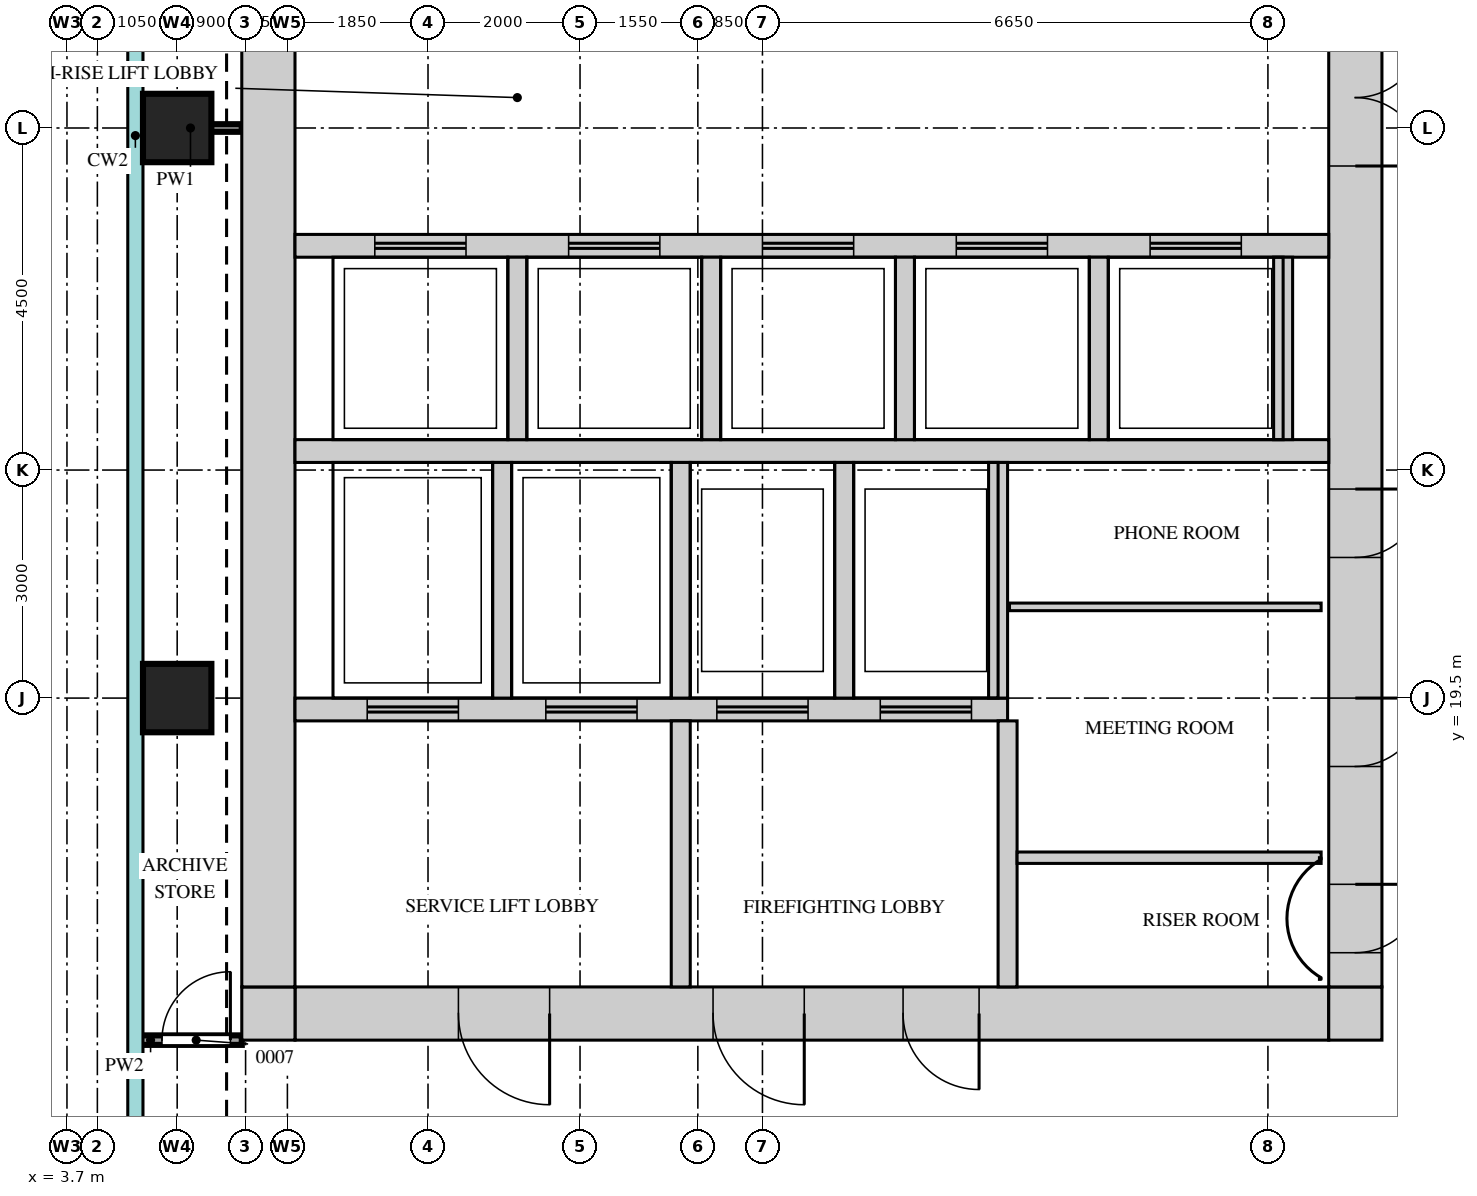
"""IFC4 building model, lengths in metres.
Left out: names, types, materials, properties, quantities, classifications, styles, units other than length and angle.
Written with IfcOpenShell. Run it as: python <this file> out.ifc"""

import sys

from ifc_helpers import new_model, si_unit, direction, frame, frame_2d, origin, origin_2d, place, context, subcontext, project, spatial, rectangle, extrude, source, transform, mapped, element, fill, save


model = new_model("IFC4")
c1 = context("Model", 3, precision=1e-05, world=origin(), true_north=direction((0.0, 1.0)))
c2 = subcontext(c1, "Body", "Model", "MODEL_VIEW")
j1 = project(units=[si_unit("LENGTHUNIT", "METRE"), si_unit("PLANEANGLEUNIT", "RADIAN")], contexts=[c1])
p1 = place(None, origin())
s1 = spatial("IfcSite", under=j1, at=p1, CompositionType="ELEMENT")
p2 = place(p1, origin())
s2 = spatial("IfcBuilding", under=s1, at=p2, CompositionType="ELEMENT")
p3 = place(p2, frame((0.0, 0.0, 226.2)))
s3 = spatial("IfcBuildingStorey", under=s2, at=p3, CompositionType="ELEMENT", Elevation=226.2)
m1 = source(origin(), c2, "Body", "SweptSolid", [
    extrude(rectangle(XDim=13.6, YDim=0.7, at=frame_2d((6.8, 0.0))), origin(), (0.0, 0.0, 1.0), 3.75),
])
p4 = place(p3, frame((6.7, 15.35, 0.0), z_axis=(0.0, 0.0, 1.0), x_axis=(1.0, 0.0, 0.0)))
e1 = element("IfcWall", 1, at=p4, inside=s3, PredefinedType="SHEAR", context=c2, shape_type="MappedRepresentation", body=[
    mapped(m1, transform((0.0, 0.0, 0.0))),
])
m2 = source(origin(), c2, "Body", "SweptSolid", [
    extrude(rectangle(XDim=1.2, YDim=2.1, at=frame_2d((0.6, 1.05))), frame((0.0, 0.36, 0.0), z_axis=(0.0, -1.0, 0.0), x_axis=(1.0, 0.0, 0.0)), (0.0, 0.0, 1.0), 0.72),
])
p5 = place(p4, frame((5.5, 0.0, 0.0)))
e2 = element("IfcOpeningElement", 2, at=p5, cuts=e1, PredefinedType="OPENING", context=c2, shape_type="MappedRepresentation", body=[
    mapped(m2, transform((0.0, 0.0, 0.0))),
])
p6 = place(p4, frame((2.15, 0.0, 0.0)))
e3 = element("IfcOpeningElement", 3, at=p6, cuts=e1, PredefinedType="OPENING", context=c2, shape_type="MappedRepresentation", body=[
    mapped(m2, transform((0.0, 0.0, 0.0))),
])
m3 = source(origin(), c2, "Body", "SweptSolid", [
    extrude(rectangle(XDim=1.0, YDim=2.1, at=frame_2d((0.5, 1.05))), frame((0.0, 0.36, 0.0), z_axis=(0.0, -1.0, 0.0), x_axis=(1.0, 0.0, 0.0)), (0.0, 0.0, 1.0), 0.72),
])
p7 = place(p4, frame((8.0, 0.0, 0.0)))
e4 = element("IfcOpeningElement", 4, at=p7, cuts=e1, PredefinedType="OPENING", context=c2, shape_type="MappedRepresentation", body=[
    mapped(m3, transform((0.0, 0.0, 0.0))),
])
m4 = source(origin(), c2, "Body", "SweptSolid", [
    extrude(rectangle(XDim=0.7, YDim=0.7, at=frame_2d((0.35, 0.0))), origin(), (0.0, 0.0, 1.0), 3.75),
])
for number, where, z_axis, x_axis in (
    (5, (20.3, 15.35, 0.0), (0.0, 0.0, 1.0), (1.0, 0.0, 0.0)),
    (6, (6.0, 15.35, 0.0), (0.0, 0.0, 1.0), (1.0, 0.0, 0.0)),
):
    element("IfcWall", number, at=place(p3, frame(where, z_axis=z_axis, x_axis=x_axis)), inside=s3, PredefinedType="SHEAR", context=c2, shape_type="MappedRepresentation", body=[
        mapped(m4, transform((0.0, 0.0, 0.0))),
    ])
m5 = source(origin(), c2, "Body", "SweptSolid", [
    extrude(rectangle(XDim=22.6, YDim=0.7, at=frame_2d((11.3, 0.0))), origin(), (0.0, 0.0, 1.0), 3.75),
])
p8 = place(p3, frame((20.65, 15.7, 0.0), z_axis=(0.0, 0.0, 1.0), x_axis=(0.0, 1.0, 0.0)))
e7 = element("IfcWall", 7, at=p8, inside=s3, PredefinedType="SHEAR", context=c2, shape_type="MappedRepresentation", body=[
    mapped(m5, transform((0.0, 0.0, 0.0))),
])
m6 = source(origin(), c2, "Body", "SweptSolid", [
    extrude(rectangle(XDim=1.8, YDim=2.1, at=frame_2d((0.9, 1.05))), frame((0.0, 0.36, 0.0), z_axis=(0.0, -1.0, 0.0), x_axis=(1.0, 0.0, 0.0)), (0.0, 0.0, 1.0), 0.72),
])
p9 = place(p8, frame((10.8, 0.0, 0.0)))
e8 = element("IfcOpeningElement", 8, at=p9, cuts=e7, PredefinedType="OPENING", context=c2, shape_type="MappedRepresentation", body=[
    mapped(m6, transform((0.0, 0.0, 0.0))),
])
m7 = source(origin(), c2, "Body", "SweptSolid", [
    extrude(rectangle(XDim=0.9, YDim=2.1, at=frame_2d((0.45, 1.05))), frame((0.0, 0.36, 0.0), z_axis=(0.0, -1.0, 0.0), x_axis=(1.0, 0.0, 0.0)), (0.0, 0.0, 1.0), 0.72),
])
p10 = place(p8, frame((0.45, 0.0, 0.0)))
e9 = element("IfcOpeningElement", 9, at=p10, cuts=e7, PredefinedType="OPENING", context=c2, shape_type="MappedRepresentation", body=[
    mapped(m7, transform((0.0, 0.0, 0.0))),
])
p11 = place(p8, frame((2.9, 0.0, 0.0)))
e10 = element("IfcOpeningElement", 10, at=p11, cuts=e7, PredefinedType="OPENING", context=c2, shape_type="MappedRepresentation", body=[
    mapped(m7, transform((0.0, 0.0, 0.0))),
])
p12 = place(p8, frame((5.65, 0.0, 0.0)))
e11 = element("IfcOpeningElement", 11, at=p12, cuts=e7, PredefinedType="OPENING", context=c2, shape_type="MappedRepresentation", body=[
    mapped(m7, transform((0.0, 0.0, 0.0))),
])
p13 = place(p3, frame((6.35, 15.7, 0.0), z_axis=(0.0, 0.0, 1.0), x_axis=(0.0, 1.0, 0.0)))
e12 = element("IfcWall", 12, at=p13, inside=s3, PredefinedType="SHEAR", context=c2, shape_type="MappedRepresentation", body=[
    mapped(m5, transform((0.0, 0.0, 0.0))),
])
m8 = source(origin(), c2, "Body", "SweptSolid", [
    extrude(rectangle(XDim=13.6, YDim=0.3, at=frame_2d((6.8, 0.0))), origin(), (0.0, 0.0, 1.0), 3.75),
])
p14 = place(p3, frame((6.7, 22.75, 0.0), z_axis=(0.0, 0.0, 1.0), x_axis=(1.0, 0.0, 0.0)))
e13 = element("IfcWall", 13, at=p14, inside=s3, PredefinedType="STANDARD", context=c2, shape_type="MappedRepresentation", body=[
    mapped(m8, transform((0.0, 0.0, 0.0))),
])
m9 = source(origin(), c2, "Body", "SweptSolid", [
    extrude(rectangle(XDim=9.375, YDim=0.3, at=frame_2d((4.688, 0.0))), origin(), (0.0, 0.0, 1.0), 3.75),
])
p15 = place(p3, frame((6.7, 19.35, 0.0), z_axis=(0.0, 0.0, 1.0), x_axis=(1.0, 0.0, 0.0)))
e14 = element("IfcWall", 14, at=p15, inside=s3, PredefinedType="STANDARD", context=c2, shape_type="MappedRepresentation", body=[
    mapped(m9, transform((0.0, 0.0, 0.0))),
])
m10 = source(origin(), c2, "Body", "SweptSolid", [
    extrude(rectangle(XDim=1.2, YDim=2.1, at=frame_2d((0.6, 1.05))), frame((0.0, 0.16, 0.0), z_axis=(0.0, -1.0, 0.0), x_axis=(1.0, 0.0, 0.0)), (0.0, 0.0, 1.0), 0.32),
])
p16 = place(p15, frame((0.95, 0.0, 0.0)))
e15 = element("IfcOpeningElement", 15, at=p16, cuts=e14, PredefinedType="OPENING", context=c2, shape_type="MappedRepresentation", body=[
    mapped(m10, transform((0.0, 0.0, 0.0))),
])
p17 = place(p15, frame((3.3, 0.0, 0.0)))
e16 = element("IfcOpeningElement", 16, at=p17, cuts=e14, PredefinedType="OPENING", context=c2, shape_type="MappedRepresentation", body=[
    mapped(m10, transform((0.0, 0.0, 0.0))),
])
p18 = place(p15, frame((5.55, 0.0, 0.0)))
e17 = element("IfcOpeningElement", 17, at=p18, cuts=e14, PredefinedType="OPENING", context=c2, shape_type="MappedRepresentation", body=[
    mapped(m10, transform((0.0, 0.0, 0.0))),
])
p19 = place(p15, frame((7.7, 0.0, 0.0)))
e18 = element("IfcOpeningElement", 18, at=p19, cuts=e14, PredefinedType="OPENING", context=c2, shape_type="MappedRepresentation", body=[
    mapped(m10, transform((0.0, 0.0, 0.0))),
])
p20 = place(p3, frame((6.7, 25.45, 0.0), z_axis=(0.0, 0.0, 1.0), x_axis=(1.0, 0.0, 0.0)))
e19 = element("IfcWall", 19, at=p20, inside=s3, PredefinedType="STANDARD", context=c2, shape_type="MappedRepresentation", body=[
    mapped(m8, transform((0.0, 0.0, 0.0))),
])
p21 = place(p20, frame((1.05, 0.0, 0.0)))
e20 = element("IfcOpeningElement", 20, at=p21, cuts=e19, PredefinedType="OPENING", context=c2, shape_type="MappedRepresentation", body=[
    mapped(m10, transform((0.0, 0.0, 0.0))),
])
p22 = place(p20, frame((3.6, 0.0, 0.0)))
e21 = element("IfcOpeningElement", 21, at=p22, cuts=e19, PredefinedType="OPENING", context=c2, shape_type="MappedRepresentation", body=[
    mapped(m10, transform((0.0, 0.0, 0.0))),
])
p23 = place(p20, frame((6.15, 0.0, 0.0)))
e22 = element("IfcOpeningElement", 22, at=p23, cuts=e19, PredefinedType="OPENING", context=c2, shape_type="MappedRepresentation", body=[
    mapped(m10, transform((0.0, 0.0, 0.0))),
])
p24 = place(p20, frame((8.7, 0.0, 0.0)))
e23 = element("IfcOpeningElement", 23, at=p24, cuts=e19, PredefinedType="OPENING", context=c2, shape_type="MappedRepresentation", body=[
    mapped(m10, transform((0.0, 0.0, 0.0))),
])
p25 = place(p20, frame((11.25, 0.0, 0.0)))
e24 = element("IfcOpeningElement", 24, at=p25, cuts=e19, PredefinedType="OPENING", context=c2, shape_type="MappedRepresentation", body=[
    mapped(m10, transform((0.0, 0.0, 0.0))),
])
m11 = source(origin(), c2, "Body", "SweptSolid", [
    extrude(rectangle(XDim=3.1, YDim=0.25, at=frame_2d((1.55, 0.0))), origin(), (0.0, 0.0, 1.0), 3.75),
])
for number, where, z_axis, x_axis in (
    (25, (9.425, 19.5, 0.0), (0.0, 0.0, 1.0), (0.0, 1.0, 0.0)),
    (26, (11.775, 19.5, 0.0), (0.0, 0.0, 1.0), (0.0, 1.0, 0.0)),
    (27, (13.925, 19.5, 0.0), (0.0, 0.0, 1.0), (0.0, 1.0, 0.0)),
    (28, (15.95, 19.5, 0.0), (0.0, 0.0, 1.0), (0.0, 1.0, 0.0)),
):
    element("IfcWall", number, at=place(p3, frame(where, z_axis=z_axis, x_axis=x_axis)), inside=s3, PredefinedType="STANDARD", context=c2, shape_type="MappedRepresentation", body=[
        mapped(m11, transform((0.0, 0.0, 0.0))),
    ])
m12 = source(origin(), c2, "Body", "SweptSolid", [
    extrude(rectangle(XDim=2.4, YDim=0.25, at=frame_2d((1.2, 0.0))), origin(), (0.0, 0.0, 1.0), 3.75),
])
for number, where, z_axis, x_axis in (
    (29, (17.275, 22.9, 0.0), (0.0, 0.0, 1.0), (0.0, 1.0, 0.0)),
    (30, (19.7, 22.9, 0.0), (0.0, 0.0, 1.0), (0.0, 1.0, 0.0)),
    (31, (9.625, 22.9, 0.0), (0.0, 0.0, 1.0), (0.0, 1.0, 0.0)),
    (32, (12.175, 22.9, 0.0), (0.0, 0.0, 1.0), (0.0, 1.0, 0.0)),
    (33, (14.725, 22.9, 0.0), (0.0, 0.0, 1.0), (0.0, 1.0, 0.0)),
):
    element("IfcWall", number, at=place(p3, frame(where, z_axis=z_axis, x_axis=x_axis)), inside=s3, PredefinedType="STANDARD", context=c2, shape_type="MappedRepresentation", body=[
        mapped(m12, transform((0.0, 0.0, 0.0))),
    ])
m13 = source(origin(), c2, "Body", "SweptSolid", [
    extrude(rectangle(XDim=3.5, YDim=0.25, at=frame_2d((1.75, 0.0))), origin(), (0.0, 0.0, 1.0), 3.75),
])
for number, where, z_axis, x_axis in (
    (34, (16.075, 15.7, 0.0), (0.0, 0.0, 1.0), (0.0, 1.0, 0.0)),
    (35, (11.775, 15.7, 0.0), (0.0, 0.0, 1.0), (0.0, 1.0, 0.0)),
):
    element("IfcWall", number, at=place(p3, frame(where, z_axis=z_axis, x_axis=x_axis)), inside=s3, PredefinedType="STANDARD", context=c2, shape_type="MappedRepresentation", body=[
        mapped(m13, transform((0.0, 0.0, 0.0))),
    ])
m14 = source(origin(), c2, "Body", "SweptSolid", [
    extrude(rectangle(XDim=0.9, YDim=0.9, at=origin_2d()), origin(), (0.0, 0.0, 1.0), 3.75),
])
for number, where, z_axis, x_axis in (
    (36, (5.15, 19.5, 0.0), (0.0, 0.0, 1.0), (1.0, 0.0, 0.0)),
    (37, (5.15, 27.0, 0.0), (0.0, 0.0, 1.0), (1.0, 0.0, 0.0)),
):
    element("IfcColumn", number, at=place(p3, frame(where, z_axis=z_axis, x_axis=x_axis)), inside=s3, PredefinedType="COLUMN", context=c2, shape_type="MappedRepresentation", body=[
        mapped(m14, transform((0.0, 0.0, 0.0))),
    ])
m15 = source(origin(), c2, "Body", "SweptSolid", [
    extrude(rectangle(XDim=1.35, YDim=0.125, at=frame_2d((0.675, 0.0))), origin(), (0.0, 0.0, 1.0), 3.8),
])
p26 = place(p3, frame((4.65, 15.0, 0.0), z_axis=(0.0, 0.0, 1.0), x_axis=(1.0, 0.0, 0.0)))
e38 = element("IfcWall", 38, at=p26, inside=s3, PredefinedType="PARTITIONING", context=c2, shape_type="MappedRepresentation", body=[
    mapped(m15, transform((0.0, 0.0, 0.0))),
])
m16 = source(origin(), c2, "Body", "SweptSolid", [
    extrude(rectangle(XDim=0.9, YDim=2.1, at=frame_2d((0.45, 1.05))), frame((0.0, 0.073, 0.0), z_axis=(0.0, -1.0, 0.0), x_axis=(1.0, 0.0, 0.0)), (0.0, 0.0, 1.0), 0.145),
])
p27 = place(p26, frame((0.3, 0.0, 0.0)))
e39 = element("IfcOpeningElement", 39, at=p27, cuts=e38, PredefinedType="OPENING", context=c2, shape_type="MappedRepresentation", body=[
    mapped(m16, transform((0.0, 0.0, 0.0))),
])
m17 = source(origin(), c2, "Body", "SweptSolid", [
    extrude(rectangle(XDim=4.0, YDim=0.15, at=frame_2d((2.0, 0.0))), origin(), (0.0, 0.0, 1.0), 3.8),
])
p28 = place(p3, frame((16.2, 17.4, 0.0), z_axis=(0.0, 0.0, 1.0), x_axis=(1.0, 0.0, 0.0)))
e40 = element("IfcWall", 40, at=p28, inside=s3, PredefinedType="PARTITIONING", context=c2, shape_type="MappedRepresentation", body=[
    mapped(m17, transform((0.0, 0.0, 0.0))),
])
m18 = source(origin(), c2, "Body", "SweptSolid", [
    extrude(rectangle(XDim=4.1, YDim=0.1, at=frame_2d((2.05, 0.0))), origin(), (0.0, 0.0, 1.0), 3.8),
])
p29 = place(p3, frame((16.1, 20.7, 0.0), z_axis=(0.0, 0.0, 1.0), x_axis=(1.0, 0.0, 0.0)))
e41 = element("IfcWall", 41, at=p29, inside=s3, PredefinedType="PARTITIONING", context=c2, shape_type="MappedRepresentation", body=[
    mapped(m18, transform((0.0, 0.0, 0.0))),
])
m19 = source(origin(), c2, "Body", "SweptSolid", [
    extrude(rectangle(XDim=1.35, YDim=0.1, at=frame_2d((0.675, 0.0))), origin(), (0.0, 0.0, 1.0), 3.8),
])
p30 = place(p3, frame((4.65, 27.0, 0.0), z_axis=(0.0, 0.0, 1.0), x_axis=(1.0, 0.0, 0.0)))
e42 = element("IfcWall", 42, at=p30, inside=s3, PredefinedType="PARTITIONING", context=c2, shape_type="MappedRepresentation", body=[
    mapped(m19, transform((0.0, 0.0, 0.0))),
])
m20 = source(origin(), c2, "Body", "SweptSolid", [
    extrude(rectangle(XDim=1.8, YDim=2.1, at=frame_2d((0.9, 1.05))), frame((0.0, 0.3, 0.0), z_axis=(0.0, -1.0, 0.0), x_axis=(1.0, 0.0, 0.0)), (0.0, 0.0, 1.0), 0.6),
])
p31 = place(p9, origin())
e43 = element("IfcDoor", 43, at=p31, inside=s3, OperationType="DOUBLE_DOOR_SINGLE_SWING", PredefinedType="DOOR", context=c2, shape_type="MappedRepresentation", body=[
    mapped(m20, transform((0.0, 0.0, 0.0))),
])
fill(e8, e43)
m21 = source(origin(), c2, "Body", "SweptSolid", [
    extrude(rectangle(XDim=0.9, YDim=2.1, at=frame_2d((0.45, 1.05))), frame((0.0, 0.3, 0.0), z_axis=(0.0, -1.0, 0.0), x_axis=(1.0, 0.0, 0.0)), (0.0, 0.0, 1.0), 0.6),
])
p32 = place(p10, origin())
e44 = element("IfcDoor", 44, at=p32, inside=s3, OperationType="SINGLE_SWING_RIGHT", PredefinedType="DOOR", context=c2, shape_type="MappedRepresentation", body=[
    mapped(m21, transform((0.0, 0.0, 0.0))),
])
fill(e9, e44)
p33 = place(p11, origin())
e45 = element("IfcDoor", 45, at=p33, inside=s3, OperationType="SINGLE_SWING_RIGHT", PredefinedType="DOOR", context=c2, shape_type="MappedRepresentation", body=[
    mapped(m21, transform((0.0, 0.0, 0.0))),
])
fill(e10, e45)
p34 = place(p12, origin())
e46 = element("IfcDoor", 46, at=p34, inside=s3, OperationType="SINGLE_SWING_RIGHT", PredefinedType="DOOR", context=c2, shape_type="MappedRepresentation", body=[
    mapped(m21, transform((0.0, 0.0, 0.0))),
])
fill(e11, e46)
m22 = source(origin(), c2, "Body", "SweptSolid", [
    extrude(rectangle(XDim=1.2, YDim=2.1, at=frame_2d((0.6, 1.05))), frame((0.0, 0.3, 0.0), z_axis=(0.0, -1.0, 0.0), x_axis=(1.0, 0.0, 0.0)), (0.0, 0.0, 1.0), 0.6),
])
p35 = place(p5, origin())
e47 = element("IfcDoor", 47, at=p35, inside=s3, OperationType="SINGLE_SWING_RIGHT", PredefinedType="DOOR", context=c2, shape_type="MappedRepresentation", body=[
    mapped(m22, transform((0.0, 0.0, 0.0))),
])
fill(e2, e47)
p36 = place(p6, origin())
e48 = element("IfcDoor", 48, at=p36, inside=s3, OperationType="SINGLE_SWING_RIGHT", PredefinedType="DOOR", context=c2, shape_type="MappedRepresentation", body=[
    mapped(m22, transform((0.0, 0.0, 0.0))),
])
fill(e3, e48)
m23 = source(origin(), c2, "Body", "SweptSolid", [
    extrude(rectangle(XDim=1.0, YDim=2.1, at=frame_2d((0.5, 1.05))), frame((0.0, 0.3, 0.0), z_axis=(0.0, -1.0, 0.0), x_axis=(1.0, 0.0, 0.0)), (0.0, 0.0, 1.0), 0.6),
])
p37 = place(p7, origin())
e49 = element("IfcDoor", 49, at=p37, inside=s3, OperationType="SINGLE_SWING_RIGHT", PredefinedType="DOOR", context=c2, shape_type="MappedRepresentation", body=[
    mapped(m23, transform((0.0, 0.0, 0.0))),
])
fill(e4, e49)
m24 = source(origin(), c2, "Body", "SweptSolid", [
    extrude(rectangle(XDim=0.9, YDim=2.1, at=frame_2d((0.45, 1.05))), frame((0.0, 0.025, 0.0), z_axis=(0.0, -1.0, 0.0), x_axis=(1.0, 0.0, 0.0)), (0.0, 0.0, 1.0), 0.05),
])
p38 = place(p27, origin())
e50 = element("IfcDoor", 50, at=p38, inside=s3, OperationType="SINGLE_SWING_LEFT", PredefinedType="DOOR", context=c2, shape_type="MappedRepresentation", body=[
    mapped(m24, transform((0.0, 0.0, 0.0))),
])
fill(e39, e50)
m25 = source(origin(), c2, "Body", "SweptSolid", [
    extrude(rectangle(XDim=1.2, YDim=2.1, at=frame_2d((0.6, 1.05))), frame((0.0, 0.025, 0.0), z_axis=(0.0, -1.0, 0.0), x_axis=(1.0, 0.0, 0.0)), (0.0, 0.0, 1.0), 0.05),
])
p39 = place(p21, origin())
e51 = element("IfcDoor", 51, at=p39, inside=s3, OperationType="DOUBLE_DOOR_SLIDING", PredefinedType="DOOR", context=c2, shape_type="MappedRepresentation", body=[
    mapped(m25, transform((0.0, 0.0, 0.0))),
])
fill(e20, e51)
p40 = place(p22, origin())
e52 = element("IfcDoor", 52, at=p40, inside=s3, OperationType="DOUBLE_DOOR_SLIDING", PredefinedType="DOOR", context=c2, shape_type="MappedRepresentation", body=[
    mapped(m25, transform((0.0, 0.0, 0.0))),
])
fill(e21, e52)
p41 = place(p23, origin())
e53 = element("IfcDoor", 53, at=p41, inside=s3, OperationType="DOUBLE_DOOR_SLIDING", PredefinedType="DOOR", context=c2, shape_type="MappedRepresentation", body=[
    mapped(m25, transform((0.0, 0.0, 0.0))),
])
fill(e22, e53)
p42 = place(p24, origin())
e54 = element("IfcDoor", 54, at=p42, inside=s3, OperationType="DOUBLE_DOOR_SLIDING", PredefinedType="DOOR", context=c2, shape_type="MappedRepresentation", body=[
    mapped(m25, transform((0.0, 0.0, 0.0))),
])
fill(e23, e54)
p43 = place(p25, origin())
e55 = element("IfcDoor", 55, at=p43, inside=s3, OperationType="DOUBLE_DOOR_SLIDING", PredefinedType="DOOR", context=c2, shape_type="MappedRepresentation", body=[
    mapped(m25, transform((0.0, 0.0, 0.0))),
])
fill(e24, e55)
p44 = place(p16, origin())
e56 = element("IfcDoor", 56, at=p44, inside=s3, OperationType="DOUBLE_DOOR_SLIDING", PredefinedType="DOOR", context=c2, shape_type="MappedRepresentation", body=[
    mapped(m25, transform((0.0, 0.0, 0.0))),
])
fill(e15, e56)
p45 = place(p17, origin())
e57 = element("IfcDoor", 57, at=p45, inside=s3, OperationType="DOUBLE_DOOR_SLIDING", PredefinedType="DOOR", context=c2, shape_type="MappedRepresentation", body=[
    mapped(m25, transform((0.0, 0.0, 0.0))),
])
fill(e16, e57)
p46 = place(p18, origin())
e58 = element("IfcDoor", 58, at=p46, inside=s3, OperationType="DOUBLE_DOOR_SLIDING", PredefinedType="DOOR", context=c2, shape_type="MappedRepresentation", body=[
    mapped(m25, transform((0.0, 0.0, 0.0))),
])
fill(e17, e58)
p47 = place(p19, origin())
e59 = element("IfcDoor", 59, at=p47, inside=s3, OperationType="DOUBLE_DOOR_SLIDING", PredefinedType="DOOR", context=c2, shape_type="MappedRepresentation", body=[
    mapped(m25, transform((0.0, 0.0, 0.0))),
])
fill(e18, e59)
save(model, sys.argv[1])
